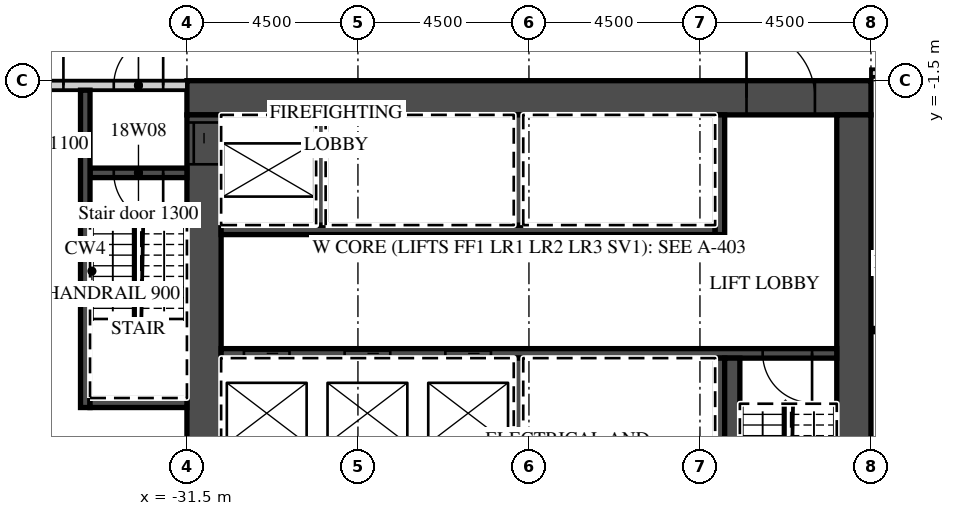
"""IFC4 building model, lengths in metres.
Left out: names, types, materials, properties, quantities, classifications, styles, units other than length and angle.
Written with IfcOpenShell. Run it as: python <this file> out.ifc"""

import sys

from ifc_helpers import new_model, si_unit, direction, frame, frame_2d, origin, place, context, subcontext, project, spatial, rectangle, extrude, element, fill, save


model = new_model("IFC4")
c1 = context("Model", 3, precision=1e-05, world=origin(), true_north=direction((0.0, 1.0)))
c2 = subcontext(c1, "Body", "Model", "MODEL_VIEW")
j1 = project(units=[si_unit("LENGTHUNIT", "METRE"), si_unit("PLANEANGLEUNIT", "RADIAN")], contexts=[c1])
p1 = place(None, origin())
s1 = spatial("IfcSite", under=j1, at=p1, CompositionType="ELEMENT")
p2 = place(p1, origin())
s2 = spatial("IfcBuilding", under=s1, at=p2, CompositionType="ELEMENT")
p3 = place(p2, frame((0.0, 0.0, 89.7)))
s3 = spatial("IfcBuildingStorey", under=s2, at=p3, CompositionType="ELEMENT", Elevation=89.7)
p4 = place(p3, frame((-13.5, -1.3, 0.0), z_axis=(0.0, 0.0, 1.0), x_axis=(1.0, 0.0, 0.0)))
e1 = element("IfcWall", 1, at=p4, inside=s3, PredefinedType="PARTITIONING", context=c2, shape_type="SweptSolid", body=[
    extrude(rectangle(XDim=58.05, YDim=0.2, at=frame_2d((29.025, 0.0))), origin(), (0.0, 0.0, 1.0), 3.02),
])
p5 = place(p4, frame((2.925, 0.0, 0.0)))
e2 = element("IfcOpeningElement", 2, at=p5, cuts=e1, PredefinedType="OPENING", context=c2, shape_type="SweptSolid", body=[
    extrude(rectangle(XDim=1.0, YDim=2.1, at=frame_2d((0.5, 1.05))), frame((0.0, 0.11, 0.0), z_axis=(0.0, -1.0, 0.0), x_axis=(1.0, 0.0, 0.0)), (0.0, 0.0, 1.0), 0.22),
])
p6 = place(p4, frame((5.075, 0.0, 0.0)))
e3 = element("IfcOpeningElement", 3, at=p6, cuts=e1, PredefinedType="OPENING", context=c2, shape_type="SweptSolid", body=[
    extrude(rectangle(XDim=1.0, YDim=2.1, at=frame_2d((0.5, 1.05))), frame((0.0, 0.11, 0.0), z_axis=(0.0, -1.0, 0.0), x_axis=(1.0, 0.0, 0.0)), (0.0, 0.0, 1.0), 0.22),
])
p7 = place(p4, frame((9.55, 0.0, 0.0)))
e4 = element("IfcOpeningElement", 4, at=p7, cuts=e1, PredefinedType="OPENING", context=c2, shape_type="SweptSolid", body=[
    extrude(rectangle(XDim=1.0, YDim=2.1, at=frame_2d((0.5, 1.05))), frame((0.0, 0.11, 0.0), z_axis=(0.0, -1.0, 0.0), x_axis=(1.0, 0.0, 0.0)), (0.0, 0.0, 1.0), 0.22),
])
p8 = place(p4, frame((14.075, 0.0, 0.0)))
e5 = element("IfcOpeningElement", 5, at=p8, cuts=e1, PredefinedType="OPENING", context=c2, shape_type="SweptSolid", body=[
    extrude(rectangle(XDim=1.0, YDim=2.1, at=frame_2d((0.5, 1.05))), frame((0.0, 0.11, 0.0), z_axis=(0.0, -1.0, 0.0), x_axis=(1.0, 0.0, 0.0)), (0.0, 0.0, 1.0), 0.22),
])
p9 = place(p4, frame((20.925, 0.0, 0.0)))
e6 = element("IfcOpeningElement", 6, at=p9, cuts=e1, PredefinedType="OPENING", context=c2, shape_type="SweptSolid", body=[
    extrude(rectangle(XDim=1.0, YDim=2.1, at=frame_2d((0.5, 1.05))), frame((0.0, 0.11, 0.0), z_axis=(0.0, -1.0, 0.0), x_axis=(1.0, 0.0, 0.0)), (0.0, 0.0, 1.0), 0.22),
])
p10 = place(p4, frame((27.862, 0.0, 0.0)))
e7 = element("IfcOpeningElement", 7, at=p10, cuts=e1, PredefinedType="OPENING", context=c2, shape_type="SweptSolid", body=[
    extrude(rectangle(XDim=1.2, YDim=2.1, at=frame_2d((0.6, 1.05))), frame((0.0, 0.11, 0.0), z_axis=(0.0, -1.0, 0.0), x_axis=(1.0, 0.0, 0.0)), (0.0, 0.0, 1.0), 0.22),
])
p11 = place(p4, frame((34.45, 0.0, 0.0)))
e8 = element("IfcOpeningElement", 8, at=p11, cuts=e1, PredefinedType="OPENING", context=c2, shape_type="SweptSolid", body=[
    extrude(rectangle(XDim=1.0, YDim=2.1, at=frame_2d((0.5, 1.05))), frame((0.0, 0.11, 0.0), z_axis=(0.0, -1.0, 0.0), x_axis=(1.0, 0.0, 0.0)), (0.0, 0.0, 1.0), 0.22),
])
p12 = place(p4, frame((38.925, 0.0, 0.0)))
e9 = element("IfcOpeningElement", 9, at=p12, cuts=e1, PredefinedType="OPENING", context=c2, shape_type="SweptSolid", body=[
    extrude(rectangle(XDim=1.0, YDim=2.1, at=frame_2d((0.5, 1.05))), frame((0.0, 0.11, 0.0), z_axis=(0.0, -1.0, 0.0), x_axis=(1.0, 0.0, 0.0)), (0.0, 0.0, 1.0), 0.22),
])
p13 = place(p4, frame((41.075, 0.0, 0.0)))
e10 = element("IfcOpeningElement", 10, at=p13, cuts=e1, PredefinedType="OPENING", context=c2, shape_type="SweptSolid", body=[
    extrude(rectangle(XDim=1.0, YDim=2.1, at=frame_2d((0.5, 1.05))), frame((0.0, 0.11, 0.0), z_axis=(0.0, -1.0, 0.0), x_axis=(1.0, 0.0, 0.0)), (0.0, 0.0, 1.0), 0.22),
])
p14 = place(p4, frame((45.55, 0.0, 0.0)))
e11 = element("IfcOpeningElement", 11, at=p14, cuts=e1, PredefinedType="OPENING", context=c2, shape_type="SweptSolid", body=[
    extrude(rectangle(XDim=1.0, YDim=2.1, at=frame_2d((0.5, 1.05))), frame((0.0, 0.11, 0.0), z_axis=(0.0, -1.0, 0.0), x_axis=(1.0, 0.0, 0.0)), (0.0, 0.0, 1.0), 0.22),
])
p15 = place(p4, frame((50.075, 0.0, 0.0)))
e12 = element("IfcOpeningElement", 12, at=p15, cuts=e1, PredefinedType="OPENING", context=c2, shape_type="SweptSolid", body=[
    extrude(rectangle(XDim=1.0, YDim=2.1, at=frame_2d((0.5, 1.05))), frame((0.0, 0.11, 0.0), z_axis=(0.0, -1.0, 0.0), x_axis=(1.0, 0.0, 0.0)), (0.0, 0.0, 1.0), 0.22),
])
p16 = place(p4, frame((56.525, 0.0, 0.0)))
e13 = element("IfcOpeningElement", 13, at=p16, cuts=e1, PredefinedType="OPENING", context=c2, shape_type="SweptSolid", body=[
    extrude(rectangle(XDim=1.0, YDim=2.1, at=frame_2d((0.5, 1.05))), frame((0.0, 0.11, 0.0), z_axis=(0.0, -1.0, 0.0), x_axis=(1.0, 0.0, 0.0)), (0.0, 0.0, 1.0), 0.22),
])
p17 = place(p3, frame((-31.5, -1.95, 0.0), z_axis=(0.0, 0.0, 1.0), x_axis=(1.0, 0.0, 0.0)))
e14 = element("IfcWall", 14, at=p17, inside=s3, PredefinedType="SHEAR", context=c2, shape_type="SweptSolid", body=[
    extrude(rectangle(XDim=18.0, YDim=0.9, at=frame_2d((9.0, 0.0))), origin(), (0.0, 0.0, 1.0), 3.02),
])
p18 = place(p17, frame((14.725, 0.0, 0.0)))
e15 = element("IfcOpeningElement", 15, at=p18, cuts=e14, PredefinedType="OPENING", context=c2, shape_type="SweptSolid", body=[
    extrude(rectangle(XDim=1.8, YDim=2.1, at=frame_2d((0.9, 1.05))), frame((0.0, 0.46, 0.0), z_axis=(0.0, -1.0, 0.0), x_axis=(1.0, 0.0, 0.0)), (0.0, 0.0, 1.0), 0.92),
])
p19 = place(p3, frame((-31.05, -15.2, 0.0), z_axis=(0.0, 0.0, 1.0), x_axis=(0.0, 1.0, 0.0)))
e16 = element("IfcWall", 16, at=p19, inside=s3, PredefinedType="SHEAR", context=c2, shape_type="SweptSolid", body=[
    extrude(rectangle(XDim=12.8, YDim=0.9, at=frame_2d((6.4, 0.0))), origin(), (0.0, 0.0, 1.0), 3.02),
])
p20 = place(p19, frame((11.5, 0.0, 0.0)))
e17 = element("IfcOpeningElement", 17, at=p20, cuts=e16, PredefinedType="OPENING", context=c2, shape_type="SweptSolid", body=[
    extrude(rectangle(XDim=1.1, YDim=2.1, at=frame_2d((0.55, 1.05))), frame((0.0, 0.46, 0.0), z_axis=(0.0, -1.0, 0.0), x_axis=(1.0, 0.0, 0.0)), (0.0, 0.0, 1.0), 0.92),
])
p21 = place(p3, frame((-13.95, -14.6, 0.0), z_axis=(0.0, 0.0, 1.0), x_axis=(0.0, 1.0, 0.0)))
e18 = element("IfcWall", 18, at=p21, inside=s3, PredefinedType="SHEAR", context=c2, shape_type="SweptSolid", body=[
    extrude(rectangle(XDim=12.2, YDim=0.9, at=frame_2d((6.1, 0.0))), origin(), (0.0, 0.0, 1.0), 3.02),
])
p22 = place(p3, frame((-30.6, -5.425, 0.0), z_axis=(0.0, 0.0, 1.0), x_axis=(1.0, 0.0, 0.0)))
e19 = element("IfcWall", 19, at=p22, inside=s3, PredefinedType="SHEAR", context=c2, shape_type="SweptSolid", body=[
    extrude(rectangle(XDim=13.0, YDim=0.25, at=frame_2d((6.5, 0.0))), origin(), (0.0, 0.0, 1.0), 3.02),
])
p23 = place(p3, frame((-17.475, -5.55, 0.0), z_axis=(0.0, 0.0, 1.0), x_axis=(0.0, 1.0, 0.0)))
e20 = element("IfcWall", 20, at=p23, inside=s3, PredefinedType="SHEAR", context=c2, shape_type="SweptSolid", body=[
    extrude(rectangle(XDim=3.15, YDim=0.25, at=frame_2d((1.575, 0.0))), origin(), (0.0, 0.0, 1.0), 3.02),
])
for number, where, z_axis, x_axis in (
    (21, (-27.975, -5.3, 0.0), (0.0, 0.0, 1.0), (0.0, 1.0, 0.0)),
    (22, (-22.775, -5.3, 0.0), (0.0, 0.0, 1.0), (0.0, 1.0, 0.0)),
):
    element("IfcWall", number, at=place(p3, frame(where, z_axis=z_axis, x_axis=x_axis)), inside=s3, PredefinedType="SHEAR", context=c2, shape_type="SweptSolid", body=[
        extrude(rectangle(XDim=2.9, YDim=0.25, at=frame_2d((1.45, 0.0))), origin(), (0.0, 0.0, 1.0), 3.02),
    ])
p24 = place(p3, frame((-30.6, -8.675, 0.0), z_axis=(0.0, 0.0, 1.0), x_axis=(1.0, 0.0, 0.0)))
e23 = element("IfcWall", 23, at=p24, inside=s3, PredefinedType="SHEAR", context=c2, shape_type="SweptSolid", body=[
    extrude(rectangle(XDim=16.2, YDim=0.25, at=frame_2d((8.1, 0.0))), origin(), (0.0, 0.0, 1.0), 3.02),
])
p25 = place(p24, frame((0.6, 0.0, 0.0)))
e24 = element("IfcOpeningElement", 24, at=p25, cuts=e23, PredefinedType="OPENING", context=c2, shape_type="SweptSolid", body=[
    extrude(rectangle(XDim=1.2, YDim=2.1, at=frame_2d((0.6, 1.05))), frame((0.0, 0.135, 0.0), z_axis=(0.0, -1.0, 0.0), x_axis=(1.0, 0.0, 0.0)), (0.0, 0.0, 1.0), 0.27),
])
p26 = place(p24, frame((3.25, 0.0, 0.0)))
e25 = element("IfcOpeningElement", 25, at=p26, cuts=e23, PredefinedType="OPENING", context=c2, shape_type="SweptSolid", body=[
    extrude(rectangle(XDim=1.2, YDim=2.1, at=frame_2d((0.6, 1.05))), frame((0.0, 0.135, 0.0), z_axis=(0.0, -1.0, 0.0), x_axis=(1.0, 0.0, 0.0)), (0.0, 0.0, 1.0), 0.27),
])
p27 = place(p24, frame((5.9, 0.0, 0.0)))
e26 = element("IfcOpeningElement", 26, at=p27, cuts=e23, PredefinedType="OPENING", context=c2, shape_type="SweptSolid", body=[
    extrude(rectangle(XDim=1.2, YDim=2.1, at=frame_2d((0.6, 1.05))), frame((0.0, 0.135, 0.0), z_axis=(0.0, -1.0, 0.0), x_axis=(1.0, 0.0, 0.0)), (0.0, 0.0, 1.0), 0.27),
])
p28 = place(p24, frame((14.25, 0.0, 0.0)))
e27 = element("IfcOpeningElement", 27, at=p28, cuts=e23, PredefinedType="OPENING", context=c2, shape_type="SweptSolid", body=[
    extrude(rectangle(XDim=1.3, YDim=2.1, at=frame_2d((0.65, 1.05))), frame((0.0, 0.135, 0.0), z_axis=(0.0, -1.0, 0.0), x_axis=(1.0, 0.0, 0.0)), (0.0, 0.0, 1.0), 0.27),
])
for number, where, z_axis, x_axis in (
    (28, (-17.475, -11.7, 0.0), (0.0, 0.0, 1.0), (0.0, 1.0, 0.0)),
    (29, (-22.775, -11.7, 0.0), (0.0, 0.0, 1.0), (0.0, 1.0, 0.0)),
):
    element("IfcWall", number, at=place(p3, frame(where, z_axis=z_axis, x_axis=x_axis)), inside=s3, PredefinedType="SHEAR", context=c2, shape_type="SweptSolid", body=[
        extrude(rectangle(XDim=2.9, YDim=0.25, at=frame_2d((1.45, 0.0))), origin(), (0.0, 0.0, 1.0), 3.02),
    ])
p29 = place(p3, frame((-17.15, -14.6, 0.0), z_axis=(0.0, 0.0, 1.0), x_axis=(0.0, 1.0, 0.0)))
e30 = element("IfcWall", 30, at=p29, inside=s3, PredefinedType="SHEAR", context=c2, shape_type="SweptSolid", body=[
    extrude(rectangle(XDim=5.8, YDim=0.4, at=frame_2d((2.9, 0.0))), origin(), (0.0, 0.0, 1.0), 3.02),
])
p30 = place(p3, frame((-44.55, -1.625, 0.0), z_axis=(0.0, 0.0, 1.0), x_axis=(1.0, 0.0, 0.0)))
e31 = element("IfcWall", 31, at=p30, inside=s3, PredefinedType="PARTITIONING", context=c2, shape_type="SweptSolid", body=[
    extrude(rectangle(XDim=13.05, YDim=0.25, at=frame_2d((6.525, 0.0))), origin(), (0.0, 0.0, 1.0), 3.02),
])
p31 = place(p30, frame((11.125, 0.0, 0.0)))
e32 = element("IfcOpeningElement", 32, at=p31, cuts=e31, PredefinedType="OPENING", context=c2, shape_type="SweptSolid", body=[
    extrude(rectangle(XDim=1.3, YDim=2.1, at=frame_2d((0.65, 1.05))), frame((0.0, 0.135, 0.0), z_axis=(0.0, -1.0, 0.0), x_axis=(1.0, 0.0, 0.0)), (0.0, 0.0, 1.0), 0.27),
])
p32 = place(p30, frame((8.7, 0.0, 0.0)))
e33 = element("IfcOpeningElement", 33, at=p32, cuts=e31, PredefinedType="OPENING", context=c2, shape_type="SweptSolid", body=[
    extrude(rectangle(XDim=1.1, YDim=2.1, at=frame_2d((0.55, 1.05))), frame((0.0, 0.135, 0.0), z_axis=(0.0, -1.0, 0.0), x_axis=(1.0, 0.0, 0.0)), (0.0, 0.0, 1.0), 0.27),
])
p33 = place(p3, frame((-34.05, -3.925, 0.0), z_axis=(0.0, 0.0, 1.0), x_axis=(1.0, 0.0, 0.0)))
e34 = element("IfcWall", 34, at=p33, inside=s3, PredefinedType="SHEAR", context=c2, shape_type="SweptSolid", body=[
    extrude(rectangle(XDim=2.55, YDim=0.25, at=frame_2d((1.275, 0.0))), origin(), (0.0, 0.0, 1.0), 3.02),
])
p34 = place(p33, frame((0.625, 0.0, 0.0)))
e35 = element("IfcOpeningElement", 35, at=p34, cuts=e34, PredefinedType="OPENING", context=c2, shape_type="SweptSolid", body=[
    extrude(rectangle(XDim=1.3, YDim=2.1, at=frame_2d((0.65, 1.05))), frame((0.0, 0.135, 0.0), z_axis=(0.0, -1.0, 0.0), x_axis=(1.0, 0.0, 0.0)), (0.0, 0.0, 1.0), 0.27),
])
p35 = place(p3, frame((-34.175, -10.1, 0.0), z_axis=(0.0, 0.0, 1.0), x_axis=(0.0, 1.0, 0.0)))
e36 = element("IfcWall", 36, at=p35, inside=s3, PredefinedType="SHEAR", context=c2, shape_type="SweptSolid", body=[
    extrude(rectangle(XDim=8.35, YDim=0.25, at=frame_2d((4.175, 0.0))), origin(), (0.0, 0.0, 1.0), 3.02),
])
p36 = place(p3, frame((-34.05, -9.975, 0.0), z_axis=(0.0, 0.0, 1.0), x_axis=(1.0, 0.0, 0.0)))
e37 = element("IfcWall", 37, at=p36, inside=s3, PredefinedType="SHEAR", context=c2, shape_type="SweptSolid", body=[
    extrude(rectangle(XDim=2.55, YDim=0.25, at=frame_2d((1.275, 0.0))), origin(), (0.0, 0.0, 1.0), 3.02),
])
p37 = place(p25, origin())
e38 = element("IfcDoor", 38, at=p37, inside=s3, OperationType="SLIDING_TO_LEFT", PredefinedType="DOOR", context=c2, shape_type="SweptSolid", body=[
    extrude(rectangle(XDim=1.2, YDim=2.1, at=frame_2d((0.6, 1.05))), frame((0.0, 0.025, 0.0), z_axis=(0.0, -1.0, 0.0), x_axis=(1.0, 0.0, 0.0)), (0.0, 0.0, 1.0), 0.05),
])
fill(e24, e38)
p38 = place(p26, origin())
e39 = element("IfcDoor", 39, at=p38, inside=s3, OperationType="SLIDING_TO_RIGHT", PredefinedType="DOOR", context=c2, shape_type="SweptSolid", body=[
    extrude(rectangle(XDim=1.2, YDim=2.1, at=frame_2d((0.6, 1.05))), frame((0.0, 0.025, 0.0), z_axis=(0.0, -1.0, 0.0), x_axis=(1.0, 0.0, 0.0)), (0.0, 0.0, 1.0), 0.05),
])
fill(e25, e39)
p39 = place(p27, origin())
e40 = element("IfcDoor", 40, at=p39, inside=s3, OperationType="SLIDING_TO_RIGHT", PredefinedType="DOOR", context=c2, shape_type="SweptSolid", body=[
    extrude(rectangle(XDim=1.2, YDim=2.1, at=frame_2d((0.6, 1.05))), frame((0.0, 0.025, 0.0), z_axis=(0.0, -1.0, 0.0), x_axis=(1.0, 0.0, 0.0)), (0.0, 0.0, 1.0), 0.05),
])
fill(e26, e40)
p40 = place(p20, origin())
e41 = element("IfcDoor", 41, at=p40, inside=s3, OperationType="SLIDING_TO_RIGHT", PredefinedType="DOOR", context=c2, shape_type="SweptSolid", body=[
    extrude(rectangle(XDim=1.1, YDim=2.1, at=frame_2d((0.55, 1.05))), frame((0.0, 0.025, 0.0), z_axis=(0.0, -1.0, 0.0), x_axis=(1.0, 0.0, 0.0)), (0.0, 0.0, 1.0), 0.05),
])
fill(e17, e41)
p41 = place(p18, origin())
e42 = element("IfcDoor", 42, at=p41, inside=s3, OperationType="DOUBLE_DOOR_DOUBLE_SWING", PredefinedType="DOOR", context=c2, shape_type="SweptSolid", body=[
    extrude(rectangle(XDim=1.8, YDim=2.1, at=frame_2d((0.9, 1.05))), frame((0.0, 0.025, 0.0), z_axis=(0.0, -1.0, 0.0), x_axis=(1.0, 0.0, 0.0)), (0.0, 0.0, 1.0), 0.05),
])
fill(e15, e42)
p42 = place(p31, origin())
e43 = element("IfcDoor", 43, at=p42, inside=s3, OperationType="SINGLE_SWING_RIGHT", PredefinedType="DOOR", context=c2, shape_type="SweptSolid", body=[
    extrude(rectangle(XDim=1.3, YDim=2.1, at=frame_2d((0.65, 1.05))), frame((0.0, 0.025, 0.0), z_axis=(0.0, -1.0, 0.0), x_axis=(1.0, 0.0, 0.0)), (0.0, 0.0, 1.0), 0.05),
])
fill(e32, e43)
p43 = place(p34, origin())
e44 = element("IfcDoor", 44, at=p43, inside=s3, OperationType="SINGLE_SWING_RIGHT", PredefinedType="DOOR", context=c2, shape_type="SweptSolid", body=[
    extrude(rectangle(XDim=1.3, YDim=2.1, at=frame_2d((0.65, 1.05))), frame((0.0, 0.025, 0.0), z_axis=(0.0, -1.0, 0.0), x_axis=(1.0, 0.0, 0.0)), (0.0, 0.0, 1.0), 0.05),
])
fill(e35, e44)
p44 = place(p32, origin())
e45 = element("IfcDoor", 45, at=p44, inside=s3, OperationType="SINGLE_SWING_RIGHT", PredefinedType="DOOR", context=c2, shape_type="SweptSolid", body=[
    extrude(rectangle(XDim=1.1, YDim=2.1, at=frame_2d((0.55, 1.05))), frame((0.0, 0.025, 0.0), z_axis=(0.0, -1.0, 0.0), x_axis=(1.0, 0.0, 0.0)), (0.0, 0.0, 1.0), 0.05),
])
fill(e33, e45)
p45 = place(p28, origin())
e46 = element("IfcDoor", 46, at=p45, inside=s3, OperationType="SINGLE_SWING_RIGHT", PredefinedType="DOOR", context=c2, shape_type="SweptSolid", body=[
    extrude(rectangle(XDim=1.3, YDim=2.1, at=frame_2d((0.65, 1.05))), frame((0.0, 0.025, 0.0), z_axis=(0.0, -1.0, 0.0), x_axis=(1.0, 0.0, 0.0)), (0.0, 0.0, 1.0), 0.05),
])
fill(e27, e46)
save(model, sys.argv[1])
